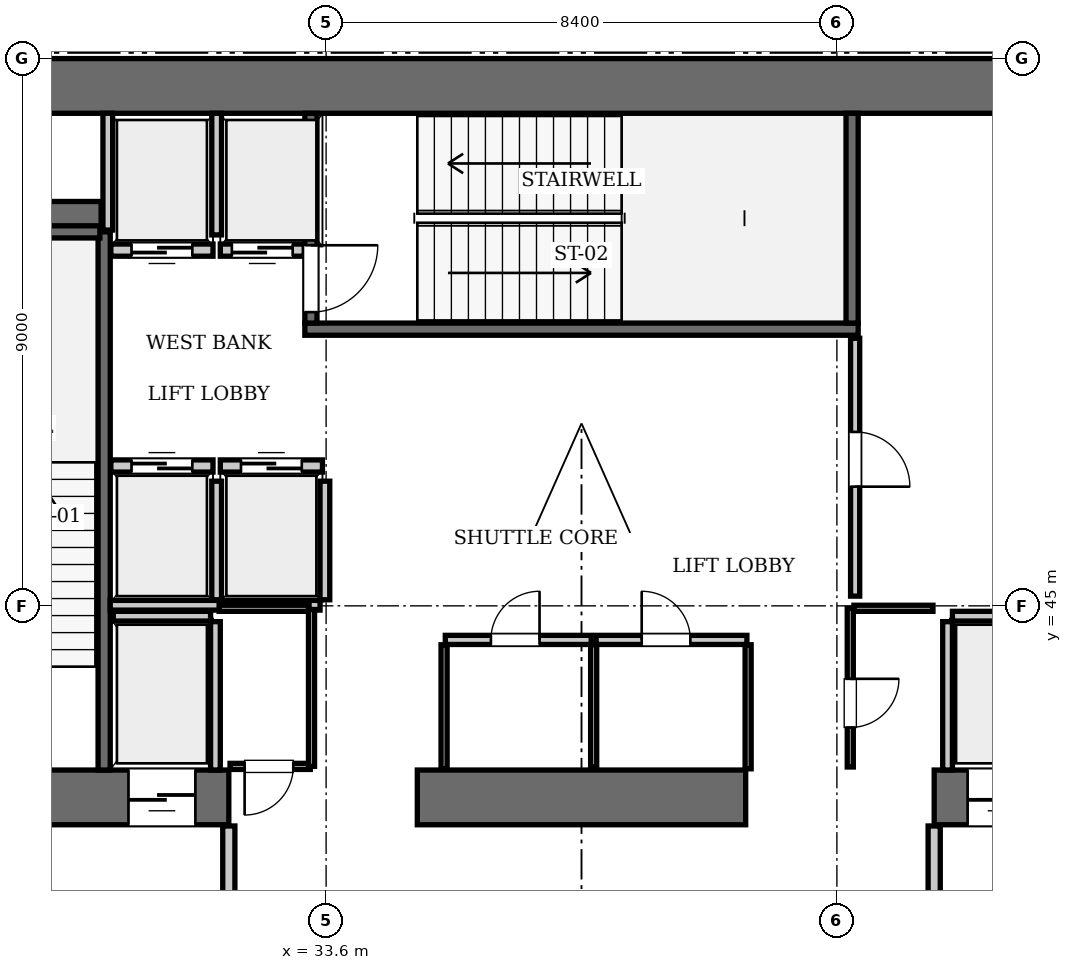
"""IFC4 building model, lengths in metres.
Left out: names, types, materials, properties, quantities, classifications, styles, units other than length and angle.
Written with IfcOpenShell. Run it as: python <this file> out.ifc"""

import sys

from ifc_helpers import new_model, si_unit, direction, frame, frame_2d, origin, place, context, subcontext, project, spatial, rectangle, extrude, element, fill, save


model = new_model("IFC4")
c1 = context("Model", 3, precision=1e-05, world=origin(), true_north=direction((0.0, 1.0)))
c2 = subcontext(c1, "Body", "Model", "MODEL_VIEW")
j1 = project(units=[si_unit("LENGTHUNIT", "METRE"), si_unit("PLANEANGLEUNIT", "RADIAN")], contexts=[c1])
p1 = place(None, origin())
s1 = spatial("IfcSite", under=j1, at=p1, CompositionType="ELEMENT")
p2 = place(p1, origin())
s2 = spatial("IfcBuilding", under=s1, at=p2, CompositionType="ELEMENT")
p3 = place(p2, frame((0.0, 0.0, -9.8)))
s3 = spatial("IfcBuildingStorey", under=s2, at=p3, CompositionType="ELEMENT", Elevation=-9.8)
p4 = place(p3, frame((25.2, 53.55, 0.0), z_axis=(0.0, 0.0, 1.0), x_axis=(1.0, 0.0, 0.0)))
e1 = element("IfcWall", 1, at=p4, inside=s3, PredefinedType="SHEAR", context=c2, shape_type="SweptSolid", body=[
    extrude(rectangle(XDim=25.2, YDim=0.9, at=frame_2d((12.6, 0.0))), origin(), (0.0, 0.0, 1.0), 4.55),
])
p5 = place(p3, frame((25.2, 41.85, 0.0), z_axis=(0.0, 0.0, 1.0), x_axis=(1.0, 0.0, 0.0)))
e2 = element("IfcWall", 2, at=p5, inside=s3, PredefinedType="SHEAR", context=c2, shape_type="SweptSolid", body=[
    extrude(rectangle(XDim=6.8, YDim=0.9, at=frame_2d((3.4, 0.0))), origin(), (0.0, 0.0, 1.0), 4.55),
])
p6 = place(p5, frame((1.65, 0.0, 0.0)))
e3 = element("IfcOpeningElement", 3, at=p6, cuts=e2, PredefinedType="OPENING", context=c2, shape_type="SweptSolid", body=[
    extrude(rectangle(XDim=1.15, YDim=2.15, at=frame_2d((0.575, 1.075))), frame((0.0, 0.46, 0.0), z_axis=(0.0, -1.0, 0.0), x_axis=(1.0, 0.0, 0.0)), (0.0, 0.0, 1.0), 0.92),
])
p7 = place(p5, frame((5.15, 0.0, 0.0)))
e4 = element("IfcOpeningElement", 4, at=p7, cuts=e2, PredefinedType="OPENING", context=c2, shape_type="SweptSolid", body=[
    extrude(rectangle(XDim=1.1, YDim=2.2, at=frame_2d((0.55, 1.1))), frame((0.0, 0.46, 0.0), z_axis=(0.0, -1.0, 0.0), x_axis=(1.0, 0.0, 0.0)), (0.0, 0.0, 1.0), 0.92),
])
p8 = place(p3, frame((35.1, 41.85, 0.0), z_axis=(0.0, 0.0, 1.0), x_axis=(1.0, 0.0, 0.0)))
e5 = element("IfcWall", 5, at=p8, inside=s3, PredefinedType="SHEAR", context=c2, shape_type="SweptSolid", body=[
    extrude(rectangle(XDim=5.4, YDim=0.9, at=frame_2d((2.7, 0.0))), origin(), (0.0, 0.0, 1.0), 4.55),
])
p9 = place(p3, frame((43.6, 41.85, 0.0), z_axis=(0.0, 0.0, 1.0), x_axis=(1.0, 0.0, 0.0)))
e6 = element("IfcWall", 6, at=p9, inside=s3, PredefinedType="SHEAR", context=c2, shape_type="SweptSolid", body=[
    extrude(rectangle(XDim=6.8, YDim=0.9, at=frame_2d((3.4, 0.0))), origin(), (0.0, 0.0, 1.0), 4.55),
])
p10 = place(p9, frame((3.9, 0.0, 0.0)))
e7 = element("IfcOpeningElement", 7, at=p10, cuts=e6, PredefinedType="OPENING", context=c2, shape_type="SweptSolid", body=[
    extrude(rectangle(XDim=1.15, YDim=2.15, at=frame_2d((0.575, 1.075))), frame((0.0, 0.46, 0.0), z_axis=(0.0, -1.0, 0.0), x_axis=(1.0, 0.0, 0.0)), (0.0, 0.0, 1.0), 0.92),
])
p11 = place(p9, frame((0.55, 0.0, 0.0)))
e8 = element("IfcOpeningElement", 8, at=p11, cuts=e6, PredefinedType="OPENING", context=c2, shape_type="SweptSolid", body=[
    extrude(rectangle(XDim=1.1, YDim=2.2, at=frame_2d((0.55, 1.1))), frame((0.0, 0.46, 0.0), z_axis=(0.0, -1.0, 0.0), x_axis=(1.0, 0.0, 0.0)), (0.0, 0.0, 1.0), 0.92),
])
p12 = place(p3, frame((26.1, 51.4, 0.0), z_axis=(0.0, 0.0, 1.0), x_axis=(1.0, 0.0, 0.0)))
e9 = element("IfcWall", 9, at=p12, inside=s3, PredefinedType="SHEAR", context=c2, shape_type="SweptSolid", body=[
    extrude(rectangle(XDim=3.8, YDim=0.5, at=frame_2d((1.9, 0.0))), origin(), (0.0, 0.0, 1.0), 4.55),
])
p13 = place(p3, frame((29.95, 42.3, 0.0), z_axis=(0.0, 0.0, 1.0), x_axis=(0.0, 1.0, 0.0)))
e10 = element("IfcWall", 10, at=p13, inside=s3, PredefinedType="SOLIDWALL", context=c2, shape_type="SweptSolid", body=[
    extrude(rectangle(XDim=8.85, YDim=0.2, at=frame_2d((4.425, 0.0))), origin(), (0.0, 0.0, 1.0), 4.2),
])
p14 = place(p3, frame((26.38, 51.15, 0.0), z_axis=(0.0, 0.0, 1.0), x_axis=(1.0, 0.0, 0.0)))
e11 = element("IfcWall", 11, at=p14, inside=s3, PredefinedType="SOLIDWALL", context=c2, shape_type="SweptSolid", body=[
    extrude(rectangle(XDim=3.5, YDim=0.2, at=frame_2d((1.75, 0.0))), origin(), (0.0, 0.0, 1.0), 4.2),
])
p15 = place(p3, frame((33.25, 49.55, 0.0), z_axis=(0.0, 0.0, 1.0), x_axis=(1.0, 0.0, 0.0)))
e12 = element("IfcWall", 12, at=p15, inside=s3, PredefinedType="SOLIDWALL", context=c2, shape_type="SweptSolid", body=[
    extrude(rectangle(XDim=9.1, YDim=0.2, at=frame_2d((4.55, 0.0))), origin(), (0.0, 0.0, 1.0), 4.2),
])
p16 = place(p3, frame((42.25, 49.65, 0.0), z_axis=(0.0, 0.0, 1.0), x_axis=(0.0, 1.0, 0.0)))
e13 = element("IfcWall", 13, at=p16, inside=s3, PredefinedType="SOLIDWALL", context=c2, shape_type="SweptSolid", body=[
    extrude(rectangle(XDim=3.45, YDim=0.2, at=frame_2d((1.725, 0.0))), origin(), (0.0, 0.0, 1.0), 4.2),
])
p17 = place(p3, frame((33.35, 49.65, 0.0), z_axis=(0.0, 0.0, 1.0), x_axis=(0.0, 1.0, 0.0)))
e14 = element("IfcWall", 14, at=p17, inside=s3, PredefinedType="SOLIDWALL", context=c2, shape_type="SweptSolid", body=[
    extrude(rectangle(XDim=3.45, YDim=0.2, at=frame_2d((1.725, 0.0))), origin(), (0.0, 0.0, 1.0), 4.2),
])
p18 = place(p17, frame((0.18, 0.0, 0.0)))
e15 = element("IfcOpeningElement", 15, at=p18, cuts=e14, PredefinedType="OPENING", context=c2, shape_type="SweptSolid", body=[
    extrude(rectangle(XDim=1.1, YDim=2.15, at=frame_2d((0.55, 1.075))), frame((0.0, 0.11, 0.0), z_axis=(0.0, -1.0, 0.0), x_axis=(1.0, 0.0, 0.0)), (0.0, 0.0, 1.0), 0.22),
])
p19 = place(p3, frame((30.06, 47.3, 0.0), z_axis=(0.0, 0.0, 1.0), x_axis=(1.0, 0.0, 0.0)))
e16 = element("IfcWall", 16, at=p19, inside=s3, PredefinedType="SOLIDWALL", context=c2, shape_type="SweptSolid", body=[
    extrude(rectangle(XDim=1.68, YDim=0.2, at=frame_2d((0.84, 0.0))), origin(), (0.0, 0.0, 1.0), 4.2),
])
p20 = place(p19, frame((0.34, 0.0, 0.0)))
e17 = element("IfcOpeningElement", 17, at=p20, cuts=e16, PredefinedType="OPENING", context=c2, shape_type="SweptSolid", body=[
    extrude(rectangle(XDim=1.0, YDim=2.15, at=frame_2d((0.5, 1.075))), frame((0.0, 0.11, 0.0), z_axis=(0.0, -1.0, 0.0), x_axis=(1.0, 0.0, 0.0)), (0.0, 0.0, 1.0), 0.22),
])
p21 = place(p3, frame((31.86, 47.3, 0.0), z_axis=(0.0, 0.0, 1.0), x_axis=(1.0, 0.0, 0.0)))
e18 = element("IfcWall", 18, at=p21, inside=s3, PredefinedType="SOLIDWALL", context=c2, shape_type="SweptSolid", body=[
    extrude(rectangle(XDim=1.68, YDim=0.2, at=frame_2d((0.84, 0.0))), origin(), (0.0, 0.0, 1.0), 4.2),
])
p22 = place(p21, frame((0.34, 0.0, 0.0)))
e19 = element("IfcOpeningElement", 19, at=p22, cuts=e18, PredefinedType="OPENING", context=c2, shape_type="SweptSolid", body=[
    extrude(rectangle(XDim=1.0, YDim=2.15, at=frame_2d((0.5, 1.075))), frame((0.0, 0.11, 0.0), z_axis=(0.0, -1.0, 0.0), x_axis=(1.0, 0.0, 0.0)), (0.0, 0.0, 1.0), 0.22),
])
p23 = place(p3, frame((30.06, 50.85, 0.0), z_axis=(0.0, 0.0, 1.0), x_axis=(1.0, 0.0, 0.0)))
e20 = element("IfcWall", 20, at=p23, inside=s3, PredefinedType="SOLIDWALL", context=c2, shape_type="SweptSolid", body=[
    extrude(rectangle(XDim=1.68, YDim=0.2, at=frame_2d((0.84, 0.0))), origin(), (0.0, 0.0, 1.0), 4.2),
])
p24 = place(p23, frame((0.34, 0.0, 0.0)))
e21 = element("IfcOpeningElement", 21, at=p24, cuts=e20, PredefinedType="OPENING", context=c2, shape_type="SweptSolid", body=[
    extrude(rectangle(XDim=1.0, YDim=2.15, at=frame_2d((0.5, 1.075))), frame((0.0, 0.11, 0.0), z_axis=(0.0, -1.0, 0.0), x_axis=(1.0, 0.0, 0.0)), (0.0, 0.0, 1.0), 0.22),
])
p25 = place(p3, frame((31.86, 50.85, 0.0), z_axis=(0.0, 0.0, 1.0), x_axis=(1.0, 0.0, 0.0)))
e22 = element("IfcWall", 22, at=p25, inside=s3, PredefinedType="SOLIDWALL", context=c2, shape_type="SweptSolid", body=[
    extrude(rectangle(XDim=1.38, YDim=0.2, at=frame_2d((0.69, 0.0))), origin(), (0.0, 0.0, 1.0), 4.2),
])
p26 = place(p25, frame((0.19, 0.0, 0.0)))
e23 = element("IfcOpeningElement", 23, at=p26, cuts=e22, PredefinedType="OPENING", context=c2, shape_type="SweptSolid", body=[
    extrude(rectangle(XDim=1.0, YDim=2.15, at=frame_2d((0.5, 1.075))), frame((0.0, 0.11, 0.0), z_axis=(0.0, -1.0, 0.0), x_axis=(1.0, 0.0, 0.0)), (0.0, 0.0, 1.0), 0.22),
])
p27 = place(p3, frame((30.1, 44.83, 0.0), z_axis=(0.0, 0.0, 1.0), x_axis=(1.0, 0.0, 0.0)))
e24 = element("IfcWall", 24, at=p27, inside=s3, PredefinedType="SOLIDWALL", context=c2, shape_type="SweptSolid", body=[
    extrude(rectangle(XDim=1.6, YDim=0.16, at=frame_2d((0.8, 0.0))), origin(), (0.0, 0.0, 1.0), 4.2),
])
p28 = place(p3, frame((31.78, 42.3, 0.0), z_axis=(0.0, 0.0, 1.0), x_axis=(0.0, 1.0, 0.0)))
e25 = element("IfcWall", 25, at=p28, inside=s3, PredefinedType="SOLIDWALL", context=c2, shape_type="SweptSolid", body=[
    extrude(rectangle(XDim=2.44, YDim=0.16, at=frame_2d((1.22, 0.0))), origin(), (0.0, 0.0, 1.0), 4.2),
])
p29 = place(p3, frame((43.9, 44.83, 0.0), z_axis=(0.0, 0.0, 1.0), x_axis=(1.0, 0.0, 0.0)))
e26 = element("IfcWall", 26, at=p29, inside=s3, PredefinedType="SOLIDWALL", context=c2, shape_type="SweptSolid", body=[
    extrude(rectangle(XDim=1.6, YDim=0.16, at=frame_2d((0.8, 0.0))), origin(), (0.0, 0.0, 1.0), 4.2),
])
p30 = place(p3, frame((43.82, 42.3, 0.0), z_axis=(0.0, 0.0, 1.0), x_axis=(0.0, 1.0, 0.0)))
e27 = element("IfcWall", 27, at=p30, inside=s3, PredefinedType="SOLIDWALL", context=c2, shape_type="SweptSolid", body=[
    extrude(rectangle(XDim=2.44, YDim=0.16, at=frame_2d((1.22, 0.0))), origin(), (0.0, 0.0, 1.0), 4.2),
])
for number, where, z_axis, x_axis in (
    (28, (31.8, 45.1, 0.0), (0.0, 0.0, 1.0), (0.0, 1.0, 0.0)),
    (29, (33.58, 45.1, 0.0), (0.0, 0.0, 1.0), (0.0, 1.0, 0.0)),
):
    element("IfcWall", number, at=place(p3, frame(where, z_axis=z_axis, x_axis=x_axis)), inside=s3, PredefinedType="SOLIDWALL", context=c2, shape_type="SweptSolid", body=[
        extrude(rectangle(XDim=1.95, YDim=0.16, at=frame_2d((0.975, 0.0))), origin(), (0.0, 0.0, 1.0), 4.2),
    ])
p31 = place(p3, frame((30.05, 45.01, 0.0), z_axis=(0.0, 0.0, 1.0), x_axis=(1.0, 0.0, 0.0)))
e30 = element("IfcWall", 30, at=p31, inside=s3, PredefinedType="SOLIDWALL", context=c2, shape_type="SweptSolid", body=[
    extrude(rectangle(XDim=3.45, YDim=0.16, at=frame_2d((1.725, 0.0))), origin(), (0.0, 0.0, 1.0), 4.2),
])
p32 = place(p3, frame((30.01, 51.18, 0.0), z_axis=(0.0, 0.0, 1.0), x_axis=(0.0, 1.0, 0.0)))
e31 = element("IfcWall", 31, at=p32, inside=s3, PredefinedType="SOLIDWALL", context=c2, shape_type="SweptSolid", body=[
    extrude(rectangle(XDim=1.92, YDim=0.16, at=frame_2d((0.96, 0.0))), origin(), (0.0, 0.0, 1.0), 4.2),
])
p33 = place(p3, frame((31.8, 51.1, 0.0), z_axis=(0.0, 0.0, 1.0), x_axis=(0.0, 1.0, 0.0)))
e32 = element("IfcWall", 32, at=p33, inside=s3, PredefinedType="SOLIDWALL", context=c2, shape_type="SweptSolid", body=[
    extrude(rectangle(XDim=2.0, YDim=0.16, at=frame_2d((1.0, 0.0))), origin(), (0.0, 0.0, 1.0), 4.2),
])
for number, where, z_axis, x_axis in (
    (33, (32.0, 38.31, 0.0), (0.0, 0.0, 1.0), (0.0, 1.0, 0.0)),
    (34, (43.6, 38.31, 0.0), (0.0, 0.0, 1.0), (0.0, 1.0, 0.0)),
):
    element("IfcWall", number, at=place(p3, frame(where, z_axis=z_axis, x_axis=x_axis)), inside=s3, PredefinedType="PARTITIONING", context=c2, shape_type="SweptSolid", body=[
        extrude(rectangle(XDim=3.07, YDim=0.2, at=frame_2d((1.535, 0.0))), origin(), (0.0, 0.0, 1.0), 4.2),
    ])
p34 = place(p3, frame((32.02, 42.36, 0.0), z_axis=(0.0, 0.0, 1.0), x_axis=(1.0, 0.0, 0.0)))
e35 = element("IfcWall", 35, at=p34, inside=s3, PredefinedType="PARTITIONING", context=c2, shape_type="SweptSolid", body=[
    extrude(rectangle(XDim=1.32, YDim=0.1, at=frame_2d((0.66, 0.0))), origin(), (0.0, 0.0, 1.0), 4.2),
])
p35 = place(p34, frame((0.24, 0.0, 0.0)))
e36 = element("IfcOpeningElement", 36, at=p35, cuts=e35, PredefinedType="OPENING", context=c2, shape_type="SweptSolid", body=[
    extrude(rectangle(XDim=0.8, YDim=2.05, at=frame_2d((0.4, 1.025))), frame((0.0, 0.06, 0.0), z_axis=(0.0, -1.0, 0.0), x_axis=(1.0, 0.0, 0.0)), (0.0, 0.0, 1.0), 0.12),
])
p36 = place(p3, frame((31.84, 44.96, 0.0), z_axis=(0.0, 0.0, 1.0), x_axis=(1.0, 0.0, 0.0)))
e37 = element("IfcWall", 37, at=p36, inside=s3, PredefinedType="PARTITIONING", context=c2, shape_type="SweptSolid", body=[
    extrude(rectangle(XDim=1.48, YDim=0.1, at=frame_2d((0.74, 0.0))), origin(), (0.0, 0.0, 1.0), 4.2),
])
p37 = place(p3, frame((33.36, 42.36, 0.0), z_axis=(0.0, 0.0, 1.0), x_axis=(0.0, 1.0, 0.0)))
e38 = element("IfcWall", 38, at=p37, inside=s3, PredefinedType="PARTITIONING", context=c2, shape_type="SweptSolid", body=[
    extrude(rectangle(XDim=2.58, YDim=0.1, at=frame_2d((1.29, 0.0))), origin(), (0.0, 0.0, 1.0), 4.2),
])
p38 = place(p3, frame((42.22, 42.35, 0.0), z_axis=(0.0, 0.0, 1.0), x_axis=(0.0, 1.0, 0.0)))
e39 = element("IfcWall", 39, at=p38, inside=s3, PredefinedType="PARTITIONING", context=c2, shape_type="SweptSolid", body=[
    extrude(rectangle(XDim=2.61, YDim=0.1, at=frame_2d((1.305, 0.0))), origin(), (0.0, 0.0, 1.0), 4.2),
])
p39 = place(p38, frame((0.65, 0.0, 0.0)))
e40 = element("IfcOpeningElement", 40, at=p39, cuts=e39, PredefinedType="OPENING", context=c2, shape_type="SweptSolid", body=[
    extrude(rectangle(XDim=0.8, YDim=2.05, at=frame_2d((0.4, 1.025))), frame((0.0, 0.06, 0.0), z_axis=(0.0, -1.0, 0.0), x_axis=(1.0, 0.0, 0.0)), (0.0, 0.0, 1.0), 0.12),
])
p40 = place(p3, frame((42.28, 44.96, 0.0), z_axis=(0.0, 0.0, 1.0), x_axis=(1.0, 0.0, 0.0)))
e41 = element("IfcWall", 41, at=p40, inside=s3, PredefinedType="PARTITIONING", context=c2, shape_type="SweptSolid", body=[
    extrude(rectangle(XDim=1.3, YDim=0.1, at=frame_2d((0.65, 0.0))), origin(), (0.0, 0.0, 1.0), 4.2),
])
p41 = place(p3, frame((35.56, 44.44, 0.0), z_axis=(0.0, 0.0, 1.0), x_axis=(1.0, 0.0, 0.0)))
e42 = element("IfcWall", 42, at=p41, inside=s3, PredefinedType="PARTITIONING", context=c2, shape_type="SweptSolid", body=[
    extrude(rectangle(XDim=2.4, YDim=0.15, at=frame_2d((1.2, 0.0))), origin(), (0.0, 0.0, 1.0), 4.2),
])
p42 = place(p41, frame((0.75, 0.0, 0.0)))
e43 = element("IfcOpeningElement", 43, at=p42, cuts=e42, PredefinedType="OPENING", context=c2, shape_type="SweptSolid", body=[
    extrude(rectangle(XDim=0.8, YDim=2.05, at=frame_2d((0.4, 1.025))), frame((0.0, 0.085, 0.0), z_axis=(0.0, -1.0, 0.0), x_axis=(1.0, 0.0, 0.0)), (0.0, 0.0, 1.0), 0.17),
])
p43 = place(p3, frame((38.04, 44.44, 0.0), z_axis=(0.0, 0.0, 1.0), x_axis=(1.0, 0.0, 0.0)))
e44 = element("IfcWall", 44, at=p43, inside=s3, PredefinedType="PARTITIONING", context=c2, shape_type="SweptSolid", body=[
    extrude(rectangle(XDim=2.48, YDim=0.15, at=frame_2d((1.24, 0.0))), origin(), (0.0, 0.0, 1.0), 4.2),
])
p44 = place(p43, frame((0.75, 0.0, 0.0)))
e45 = element("IfcOpeningElement", 45, at=p44, cuts=e44, PredefinedType="OPENING", context=c2, shape_type="SweptSolid", body=[
    extrude(rectangle(XDim=0.8, YDim=2.05, at=frame_2d((0.4, 1.025))), frame((0.0, 0.085, 0.0), z_axis=(0.0, -1.0, 0.0), x_axis=(1.0, 0.0, 0.0)), (0.0, 0.0, 1.0), 0.17),
])
for number, where, z_axis, x_axis in (
    (46, (35.54, 42.32, 0.0), (0.0, 0.0, 1.0), (0.0, 1.0, 0.0)),
    (47, (40.54, 42.32, 0.0), (0.0, 0.0, 1.0), (0.0, 1.0, 0.0)),
):
    element("IfcWall", number, at=place(p3, frame(where, z_axis=z_axis, x_axis=x_axis)), inside=s3, PredefinedType="PARTITIONING", context=c2, shape_type="SweptSolid", body=[
        extrude(rectangle(XDim=2.04, YDim=0.1, at=frame_2d((1.02, 0.0))), origin(), (0.0, 0.0, 1.0), 4.2),
    ])
p45 = place(p3, frame((38.0, 42.35, 0.0), z_axis=(0.0, 0.0, 1.0), x_axis=(0.0, 1.0, 0.0)))
e48 = element("IfcWall", 48, at=p45, inside=s3, PredefinedType="PARTITIONING", context=c2, shape_type="SweptSolid", body=[
    extrude(rectangle(XDim=2.01, YDim=0.1, at=frame_2d((1.005, 0.0))), origin(), (0.0, 0.0, 1.0), 4.2),
])
p46 = place(p3, frame((42.3, 45.16, 0.0), z_axis=(0.0, 0.0, 1.0), x_axis=(0.0, 1.0, 0.0)))
e49 = element("IfcWall", 49, at=p46, inside=s3, PredefinedType="PARTITIONING", context=c2, shape_type="SweptSolid", body=[
    extrude(rectangle(XDim=4.24, YDim=0.15, at=frame_2d((2.12, 0.0))), origin(), (0.0, 0.0, 1.0), 4.2),
])
p47 = place(p46, frame((1.8, 0.0, 0.0)))
e50 = element("IfcOpeningElement", 50, at=p47, cuts=e49, PredefinedType="OPENING", context=c2, shape_type="SweptSolid", body=[
    extrude(rectangle(XDim=0.9, YDim=2.1, at=frame_2d((0.45, 1.05))), frame((0.0, 0.085, 0.0), z_axis=(0.0, -1.0, 0.0), x_axis=(1.0, 0.0, 0.0)), (0.0, 0.0, 1.0), 0.17),
])
p48 = place(p18, frame((1.1, 0.0, 0.0), z_axis=(0.0, 0.0, 1.0), x_axis=(-1.0, 0.0, 0.0)))
e51 = element("IfcDoor", 51, at=p48, inside=s3, OperationType="SINGLE_SWING_LEFT", PredefinedType="DOOR", context=c2, shape_type="SweptSolid", body=[
    extrude(rectangle(XDim=1.1, YDim=2.15, at=frame_2d((0.55, 1.075))), frame((0.0, 0.025, 0.0), z_axis=(0.0, -1.0, 0.0), x_axis=(1.0, 0.0, 0.0)), (0.0, 0.0, 1.0), 0.05),
])
fill(e15, e51)
p49 = place(p20, origin())
e52 = element("IfcDoor", 52, at=p49, inside=s3, OperationType="SLIDING_TO_LEFT", PredefinedType="DOOR", context=c2, shape_type="SweptSolid", body=[
    extrude(rectangle(XDim=1.0, YDim=2.15, at=frame_2d((0.5, 1.075))), frame((0.0, 0.025, 0.0), z_axis=(0.0, -1.0, 0.0), x_axis=(1.0, 0.0, 0.0)), (0.0, 0.0, 1.0), 0.05),
])
fill(e17, e52)
p50 = place(p22, origin())
e53 = element("IfcDoor", 53, at=p50, inside=s3, OperationType="SLIDING_TO_LEFT", PredefinedType="DOOR", context=c2, shape_type="SweptSolid", body=[
    extrude(rectangle(XDim=1.0, YDim=2.15, at=frame_2d((0.5, 1.075))), frame((0.0, 0.025, 0.0), z_axis=(0.0, -1.0, 0.0), x_axis=(1.0, 0.0, 0.0)), (0.0, 0.0, 1.0), 0.05),
])
fill(e19, e53)
p51 = place(p24, frame((1.0, 0.0, 0.0), z_axis=(0.0, 0.0, 1.0), x_axis=(-1.0, 0.0, 0.0)))
e54 = element("IfcDoor", 54, at=p51, inside=s3, OperationType="SLIDING_TO_LEFT", PredefinedType="DOOR", context=c2, shape_type="SweptSolid", body=[
    extrude(rectangle(XDim=1.0, YDim=2.15, at=frame_2d((0.5, 1.075))), frame((0.0, 0.025, 0.0), z_axis=(0.0, -1.0, 0.0), x_axis=(1.0, 0.0, 0.0)), (0.0, 0.0, 1.0), 0.05),
])
fill(e21, e54)
p52 = place(p26, frame((1.0, 0.0, 0.0), z_axis=(0.0, 0.0, 1.0), x_axis=(-1.0, 0.0, 0.0)))
e55 = element("IfcDoor", 55, at=p52, inside=s3, OperationType="SLIDING_TO_LEFT", PredefinedType="DOOR", context=c2, shape_type="SweptSolid", body=[
    extrude(rectangle(XDim=1.0, YDim=2.15, at=frame_2d((0.5, 1.075))), frame((0.0, 0.025, 0.0), z_axis=(0.0, -1.0, 0.0), x_axis=(1.0, 0.0, 0.0)), (0.0, 0.0, 1.0), 0.05),
])
fill(e23, e55)
p53 = place(p7, frame((1.1, 0.0, 0.0), z_axis=(0.0, 0.0, 1.0), x_axis=(-1.0, 0.0, 0.0)))
e56 = element("IfcDoor", 56, at=p53, inside=s3, OperationType="SLIDING_TO_LEFT", PredefinedType="DOOR", context=c2, shape_type="SweptSolid", body=[
    extrude(rectangle(XDim=1.1, YDim=2.2, at=frame_2d((0.55, 1.1))), frame((0.0, 0.025, 0.0), z_axis=(0.0, -1.0, 0.0), x_axis=(1.0, 0.0, 0.0)), (0.0, 0.0, 1.0), 0.05),
])
fill(e4, e56)
p54 = place(p11, frame((1.1, 0.0, 0.0), z_axis=(0.0, 0.0, 1.0), x_axis=(-1.0, 0.0, 0.0)))
e57 = element("IfcDoor", 57, at=p54, inside=s3, OperationType="SLIDING_TO_LEFT", PredefinedType="DOOR", context=c2, shape_type="SweptSolid", body=[
    extrude(rectangle(XDim=1.1, YDim=2.2, at=frame_2d((0.55, 1.1))), frame((0.0, 0.025, 0.0), z_axis=(0.0, -1.0, 0.0), x_axis=(1.0, 0.0, 0.0)), (0.0, 0.0, 1.0), 0.05),
])
fill(e8, e57)
p55 = place(p35, frame((0.8, 0.0, 0.0), z_axis=(0.0, 0.0, 1.0), x_axis=(-1.0, 0.0, 0.0)))
e58 = element("IfcDoor", 58, at=p55, inside=s3, OperationType="SINGLE_SWING_RIGHT", PredefinedType="DOOR", context=c2, shape_type="SweptSolid", body=[
    extrude(rectangle(XDim=0.8, YDim=2.05, at=frame_2d((0.4, 1.025))), frame((0.0, 0.025, 0.0), z_axis=(0.0, -1.0, 0.0), x_axis=(1.0, 0.0, 0.0)), (0.0, 0.0, 1.0), 0.05),
])
fill(e36, e58)
p56 = place(p39, frame((0.8, 0.0, 0.0), z_axis=(0.0, 0.0, 1.0), x_axis=(-1.0, 0.0, 0.0)))
e59 = element("IfcDoor", 59, at=p56, inside=s3, OperationType="SINGLE_SWING_LEFT", PredefinedType="DOOR", context=c2, shape_type="SweptSolid", body=[
    extrude(rectangle(XDim=0.8, YDim=2.05, at=frame_2d((0.4, 1.025))), frame((0.0, 0.025, 0.0), z_axis=(0.0, -1.0, 0.0), x_axis=(1.0, 0.0, 0.0)), (0.0, 0.0, 1.0), 0.05),
])
fill(e40, e59)
p57 = place(p42, origin())
e60 = element("IfcDoor", 60, at=p57, inside=s3, OperationType="SINGLE_SWING_RIGHT", PredefinedType="DOOR", context=c2, shape_type="SweptSolid", body=[
    extrude(rectangle(XDim=0.8, YDim=2.05, at=frame_2d((0.4, 1.025))), frame((0.0, 0.025, 0.0), z_axis=(0.0, -1.0, 0.0), x_axis=(1.0, 0.0, 0.0)), (0.0, 0.0, 1.0), 0.05),
])
fill(e43, e60)
p58 = place(p44, origin())
e61 = element("IfcDoor", 61, at=p58, inside=s3, OperationType="SINGLE_SWING_LEFT", PredefinedType="DOOR", context=c2, shape_type="SweptSolid", body=[
    extrude(rectangle(XDim=0.8, YDim=2.05, at=frame_2d((0.4, 1.025))), frame((0.0, 0.025, 0.0), z_axis=(0.0, -1.0, 0.0), x_axis=(1.0, 0.0, 0.0)), (0.0, 0.0, 1.0), 0.05),
])
fill(e45, e61)
p59 = place(p47, frame((0.9, 0.0, 0.0), z_axis=(0.0, 0.0, 1.0), x_axis=(-1.0, 0.0, 0.0)))
e62 = element("IfcDoor", 62, at=p59, inside=s3, OperationType="SINGLE_SWING_RIGHT", PredefinedType="DOOR", context=c2, shape_type="SweptSolid", body=[
    extrude(rectangle(XDim=0.9, YDim=2.1, at=frame_2d((0.45, 1.05))), frame((0.0, 0.025, 0.0), z_axis=(0.0, -1.0, 0.0), x_axis=(1.0, 0.0, 0.0)), (0.0, 0.0, 1.0), 0.05),
])
fill(e50, e62)
save(model, sys.argv[1])
